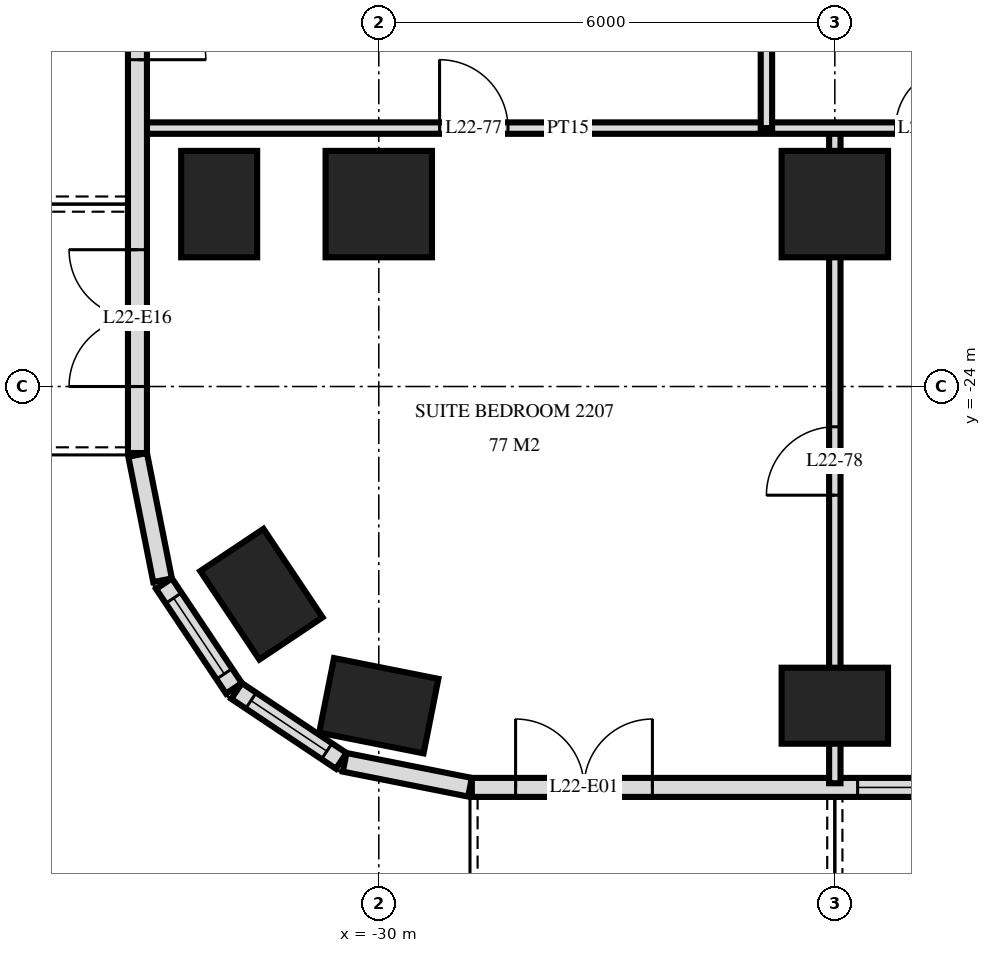
"""IFC4 building model, lengths in metres.
Left out: names, types, materials, properties, quantities, classifications, styles, units other than length and angle.
Written with IfcOpenShell. Run it as: python <this file> out.ifc"""

import sys

from ifc_helpers import new_model, si_unit, direction, frame, frame_2d, origin, origin_2d, place, context, subcontext, project, spatial, rectangle, extrude, element, fill, save


model = new_model("IFC4")
c1 = context("Model", 3, precision=1e-05, world=origin(), true_north=direction((0.0, 1.0)))
c2 = subcontext(c1, "Body", "Model", "MODEL_VIEW")
j1 = project(units=[si_unit("LENGTHUNIT", "METRE"), si_unit("PLANEANGLEUNIT", "RADIAN")], contexts=[c1])
p1 = place(None, origin())
s1 = spatial("IfcSite", under=j1, at=p1, CompositionType="ELEMENT")
p2 = place(p1, origin())
s2 = spatial("IfcBuilding", under=s1, at=p2, CompositionType="ELEMENT")
p3 = place(p2, frame((0.0, 0.0, 88.8)))
s3 = spatial("IfcBuildingStorey", under=s2, at=p3, CompositionType="ELEMENT", Elevation=88.8)
for number, where, z_axis, x_axis in (
    (1, (-32.1, -21.6, 0.0), (0.0, 0.0, 1.0), (0.0, 1.0, 0.0)),
    (2, (-31.544, -26.733, 0.0), (0.0, 0.0, 1.0), (-0.556, 0.831, 0.0)),
    (3, (-30.0, -28.2, 0.0), (0.0, 0.0, 1.0), (-0.981, 0.195, 0.0)),
):
    element("IfcColumn", number, at=place(p3, frame(where, z_axis=z_axis, x_axis=x_axis)), inside=s3, PredefinedType="COLUMN", context=c2, shape_type="SweptSolid", body=[
        extrude(rectangle(XDim=1.4, YDim=1.0, at=origin_2d()), origin(), (0.0, 0.0, 1.0), 3.6),
    ])
p4 = place(p3, frame((-30.0, -21.6, 0.0), z_axis=(0.0, 0.0, 1.0), x_axis=(1.0, 0.0, 0.0)))
e4 = element("IfcColumn", 4, at=p4, inside=s3, PredefinedType="COLUMN", context=c2, shape_type="SweptSolid", body=[
    extrude(rectangle(XDim=1.4, YDim=1.4, at=origin_2d()), origin(), (0.0, 0.0, 1.0), 3.6),
])
p5 = place(p3, frame((-24.0, -28.2, 0.0), z_axis=(0.0, 0.0, 1.0), x_axis=(1.0, 0.0, 0.0)))
e5 = element("IfcColumn", 5, at=p5, inside=s3, PredefinedType="COLUMN", context=c2, shape_type="SweptSolid", body=[
    extrude(rectangle(XDim=1.4, YDim=1.0, at=origin_2d()), origin(), (0.0, 0.0, 1.0), 3.6),
])
p6 = place(p3, frame((-24.0, -21.6, 0.0), z_axis=(0.0, 0.0, 1.0), x_axis=(1.0, 0.0, 0.0)))
e6 = element("IfcColumn", 6, at=p6, inside=s3, PredefinedType="COLUMN", context=c2, shape_type="SweptSolid", body=[
    extrude(rectangle(XDim=1.4, YDim=1.4, at=origin_2d()), origin(), (0.0, 0.0, 1.0), 3.6),
])
p7 = place(p3, frame((-33.175, -3.325, 0.0), z_axis=(0.0, 0.0, 1.0), x_axis=(0.0, -1.0, 0.0)))
e7 = element("IfcWall", 7, at=p7, inside=s3, PredefinedType="SOLIDWALL", context=c2, shape_type="SweptSolid", body=[
    extrude(rectangle(XDim=21.551, YDim=0.25, at=frame_2d((10.775, 0.0))), origin(), (0.0, 0.0, 1.0), 3.32),
])
p8 = place(p7, frame((7.025, 0.0, 0.0)))
e8 = element("IfcOpeningElement", 8, at=p8, cuts=e7, PredefinedType="OPENING", context=c2, shape_type="SweptSolid", body=[
    extrude(rectangle(XDim=1.8, YDim=2.4, at=frame_2d((0.9, 1.2))), frame((0.0, 0.135, 0.0), z_axis=(0.0, -1.0, 0.0), x_axis=(1.0, 0.0, 0.0)), (0.0, 0.0, 1.0), 0.27),
])
p9 = place(p7, frame((12.075, 0.0, 0.3)))
e9 = element("IfcOpeningElement", 9, at=p9, cuts=e7, PredefinedType="OPENING", context=c2, shape_type="SweptSolid", body=[
    extrude(rectangle(XDim=1.2, YDim=2.1, at=frame_2d((0.6, 1.05))), frame((0.0, 0.135, 0.0), z_axis=(0.0, -1.0, 0.0), x_axis=(1.0, 0.0, 0.0)), (0.0, 0.0, 1.0), 0.27),
])
p10 = place(p7, frame((14.575, 0.0, 0.0)))
e10 = element("IfcOpeningElement", 10, at=p10, cuts=e7, PredefinedType="OPENING", context=c2, shape_type="SweptSolid", body=[
    extrude(rectangle(XDim=1.8, YDim=2.4, at=frame_2d((0.9, 1.2))), frame((0.0, 0.135, 0.0), z_axis=(0.0, -1.0, 0.0), x_axis=(1.0, 0.0, 0.0)), (0.0, 0.0, 1.0), 0.27),
])
p11 = place(p7, frame((18.875, 0.0, 0.0)))
e11 = element("IfcOpeningElement", 11, at=p11, cuts=e7, PredefinedType="OPENING", context=c2, shape_type="SweptSolid", body=[
    extrude(rectangle(XDim=1.8, YDim=2.4, at=frame_2d((0.9, 1.2))), frame((0.0, 0.135, 0.0), z_axis=(0.0, -1.0, 0.0), x_axis=(1.0, 0.0, 0.0)), (0.0, 0.0, 1.0), 0.27),
])
p12 = place(p3, frame((-33.173, -24.9, 0.0), z_axis=(0.0, 0.0, 1.0), x_axis=(0.195166572128, -0.980770110232, 0.0)))
e12 = element("IfcWall", 12, at=p12, inside=s3, PredefinedType="SOLIDWALL", context=c2, shape_type="SweptSolid", body=[
    extrude(rectangle(XDim=1.681, YDim=0.25, at=frame_2d((0.841, 0.0))), origin(), (0.0, 0.0, 1.0), 3.32),
])
p13 = place(p3, frame((-32.826, -26.594, 0.0), z_axis=(0.0, 0.0, 1.0), x_axis=(0.55555029066, -0.831482937015, 0.0)))
e13 = element("IfcWall", 13, at=p13, inside=s3, PredefinedType="SOLIDWALL", context=c2, shape_type="SweptSolid", body=[
    extrude(rectangle(XDim=1.656, YDim=0.25, at=frame_2d((0.828, 0.0))), origin(), (0.0, 0.0, 1.0), 3.32),
])
p14 = place(p13, frame((0.228, 0.0, 0.9)))
e14 = element("IfcOpeningElement", 14, at=p14, cuts=e13, PredefinedType="OPENING", context=c2, shape_type="SweptSolid", body=[
    extrude(rectangle(XDim=1.2, YDim=1.5, at=frame_2d((0.6, 0.75))), frame((0.0, 0.135, 0.0), z_axis=(0.0, -1.0, 0.0), x_axis=(1.0, 0.0, 0.0)), (0.0, 0.0, 1.0), 0.27),
])
p15 = place(p3, frame((-31.871, -28.006, 0.0), z_axis=(0.0, 0.0, 1.0), x_axis=(0.831482937015, -0.55555029066, 0.0)))
e15 = element("IfcWall", 15, at=p15, inside=s3, PredefinedType="SOLIDWALL", context=c2, shape_type="SweptSolid", body=[
    extrude(rectangle(XDim=1.656, YDim=0.25, at=frame_2d((0.828, 0.0))), origin(), (0.0, 0.0, 1.0), 3.32),
])
p16 = place(p15, frame((0.228, 0.0, 0.9)))
e16 = element("IfcOpeningElement", 16, at=p16, cuts=e15, PredefinedType="OPENING", context=c2, shape_type="SweptSolid", body=[
    extrude(rectangle(XDim=1.2, YDim=1.5, at=frame_2d((0.6, 0.75))), frame((0.0, 0.135, 0.0), z_axis=(0.0, -1.0, 0.0), x_axis=(1.0, 0.0, 0.0)), (0.0, 0.0, 1.0), 0.27),
])
p17 = place(p3, frame((-30.449, -28.945, 0.0), z_axis=(0.0, 0.0, 1.0), x_axis=(0.980775640221, -0.19513878023, 0.0)))
e17 = element("IfcWall", 17, at=p17, inside=s3, PredefinedType="SOLIDWALL", context=c2, shape_type="SweptSolid", body=[
    extrude(rectangle(XDim=1.681, YDim=0.25, at=frame_2d((0.841, 0.0))), origin(), (0.0, 0.0, 1.0), 3.32),
])
p18 = place(p3, frame((-28.775, -29.275, 0.0), z_axis=(0.0, 0.0, 1.0), x_axis=(1.0, 0.0, 0.0)))
e18 = element("IfcWall", 18, at=p18, inside=s3, PredefinedType="SOLIDWALL", context=c2, shape_type="SweptSolid", body=[
    extrude(rectangle(XDim=57.551, YDim=0.25, at=frame_2d((28.775, 0.0))), origin(), (0.0, 0.0, 1.0), 3.32),
])
p19 = place(p18, frame((0.575, 0.0, 0.0)))
e19 = element("IfcOpeningElement", 19, at=p19, cuts=e18, PredefinedType="OPENING", context=c2, shape_type="SweptSolid", body=[
    extrude(rectangle(XDim=1.8, YDim=2.4, at=frame_2d((0.9, 1.2))), frame((0.0, 0.135, 0.0), z_axis=(0.0, -1.0, 0.0), x_axis=(1.0, 0.0, 0.0)), (0.0, 0.0, 1.0), 0.27),
])
p20 = place(p18, frame((5.075, 0.0, 0.3)))
e20 = element("IfcOpeningElement", 20, at=p20, cuts=e18, PredefinedType="OPENING", context=c2, shape_type="SweptSolid", body=[
    extrude(rectangle(XDim=2.4, YDim=2.1, at=frame_2d((1.2, 1.05))), frame((0.0, 0.135, 0.0), z_axis=(0.0, -1.0, 0.0), x_axis=(1.0, 0.0, 0.0)), (0.0, 0.0, 1.0), 0.27),
])
p21 = place(p18, frame((8.375, 0.0, 0.0)))
e21 = element("IfcOpeningElement", 21, at=p21, cuts=e18, PredefinedType="OPENING", context=c2, shape_type="SweptSolid", body=[
    extrude(rectangle(XDim=1.8, YDim=2.4, at=frame_2d((0.9, 1.2))), frame((0.0, 0.135, 0.0), z_axis=(0.0, -1.0, 0.0), x_axis=(1.0, 0.0, 0.0)), (0.0, 0.0, 1.0), 0.27),
])
p22 = place(p18, frame((11.375, 0.0, 0.0)))
e22 = element("IfcOpeningElement", 22, at=p22, cuts=e18, PredefinedType="OPENING", context=c2, shape_type="SweptSolid", body=[
    extrude(rectangle(XDim=1.8, YDim=2.4, at=frame_2d((0.9, 1.2))), frame((0.0, 0.135, 0.0), z_axis=(0.0, -1.0, 0.0), x_axis=(1.0, 0.0, 0.0)), (0.0, 0.0, 1.0), 0.27),
])
p23 = place(p18, frame((14.075, 0.0, 0.3)))
e23 = element("IfcOpeningElement", 23, at=p23, cuts=e18, PredefinedType="OPENING", context=c2, shape_type="SweptSolid", body=[
    extrude(rectangle(XDim=2.4, YDim=2.1, at=frame_2d((1.2, 1.05))), frame((0.0, 0.135, 0.0), z_axis=(0.0, -1.0, 0.0), x_axis=(1.0, 0.0, 0.0)), (0.0, 0.0, 1.0), 0.27),
])
p24 = place(p18, frame((17.375, 0.0, 0.0)))
e24 = element("IfcOpeningElement", 24, at=p24, cuts=e18, PredefinedType="OPENING", context=c2, shape_type="SweptSolid", body=[
    extrude(rectangle(XDim=1.8, YDim=2.4, at=frame_2d((0.9, 1.2))), frame((0.0, 0.135, 0.0), z_axis=(0.0, -1.0, 0.0), x_axis=(1.0, 0.0, 0.0)), (0.0, 0.0, 1.0), 0.27),
])
p25 = place(p18, frame((20.075, 0.0, 0.3)))
e25 = element("IfcOpeningElement", 25, at=p25, cuts=e18, PredefinedType="OPENING", context=c2, shape_type="SweptSolid", body=[
    extrude(rectangle(XDim=2.4, YDim=2.1, at=frame_2d((1.2, 1.05))), frame((0.0, 0.135, 0.0), z_axis=(0.0, -1.0, 0.0), x_axis=(1.0, 0.0, 0.0)), (0.0, 0.0, 1.0), 0.27),
])
p26 = place(p18, frame((23.075, 0.0, 0.3)))
e26 = element("IfcOpeningElement", 26, at=p26, cuts=e18, PredefinedType="OPENING", context=c2, shape_type="SweptSolid", body=[
    extrude(rectangle(XDim=2.4, YDim=2.1, at=frame_2d((1.2, 1.05))), frame((0.0, 0.135, 0.0), z_axis=(0.0, -1.0, 0.0), x_axis=(1.0, 0.0, 0.0)), (0.0, 0.0, 1.0), 0.27),
])
p27 = place(p18, frame((26.375, 0.0, 0.0)))
e27 = element("IfcOpeningElement", 27, at=p27, cuts=e18, PredefinedType="OPENING", context=c2, shape_type="SweptSolid", body=[
    extrude(rectangle(XDim=1.8, YDim=2.4, at=frame_2d((0.9, 1.2))), frame((0.0, 0.135, 0.0), z_axis=(0.0, -1.0, 0.0), x_axis=(1.0, 0.0, 0.0)), (0.0, 0.0, 1.0), 0.27),
])
p28 = place(p18, frame((29.375, 0.0, 0.0)))
e28 = element("IfcOpeningElement", 28, at=p28, cuts=e18, PredefinedType="OPENING", context=c2, shape_type="SweptSolid", body=[
    extrude(rectangle(XDim=1.8, YDim=2.4, at=frame_2d((0.9, 1.2))), frame((0.0, 0.135, 0.0), z_axis=(0.0, -1.0, 0.0), x_axis=(1.0, 0.0, 0.0)), (0.0, 0.0, 1.0), 0.27),
])
p29 = place(p18, frame((32.075, 0.0, 0.3)))
e29 = element("IfcOpeningElement", 29, at=p29, cuts=e18, PredefinedType="OPENING", context=c2, shape_type="SweptSolid", body=[
    extrude(rectangle(XDim=2.4, YDim=2.1, at=frame_2d((1.2, 1.05))), frame((0.0, 0.135, 0.0), z_axis=(0.0, -1.0, 0.0), x_axis=(1.0, 0.0, 0.0)), (0.0, 0.0, 1.0), 0.27),
])
p30 = place(p18, frame((35.375, 0.0, 0.0)))
e30 = element("IfcOpeningElement", 30, at=p30, cuts=e18, PredefinedType="OPENING", context=c2, shape_type="SweptSolid", body=[
    extrude(rectangle(XDim=1.8, YDim=2.4, at=frame_2d((0.9, 1.2))), frame((0.0, 0.135, 0.0), z_axis=(0.0, -1.0, 0.0), x_axis=(1.0, 0.0, 0.0)), (0.0, 0.0, 1.0), 0.27),
])
p31 = place(p18, frame((38.075, 0.0, 0.3)))
e31 = element("IfcOpeningElement", 31, at=p31, cuts=e18, PredefinedType="OPENING", context=c2, shape_type="SweptSolid", body=[
    extrude(rectangle(XDim=2.4, YDim=2.1, at=frame_2d((1.2, 1.05))), frame((0.0, 0.135, 0.0), z_axis=(0.0, -1.0, 0.0), x_axis=(1.0, 0.0, 0.0)), (0.0, 0.0, 1.0), 0.27),
])
p32 = place(p18, frame((41.075, 0.0, 0.3)))
e32 = element("IfcOpeningElement", 32, at=p32, cuts=e18, PredefinedType="OPENING", context=c2, shape_type="SweptSolid", body=[
    extrude(rectangle(XDim=2.4, YDim=2.1, at=frame_2d((1.2, 1.05))), frame((0.0, 0.135, 0.0), z_axis=(0.0, -1.0, 0.0), x_axis=(1.0, 0.0, 0.0)), (0.0, 0.0, 1.0), 0.27),
])
p33 = place(p18, frame((44.375, 0.0, 0.0)))
e33 = element("IfcOpeningElement", 33, at=p33, cuts=e18, PredefinedType="OPENING", context=c2, shape_type="SweptSolid", body=[
    extrude(rectangle(XDim=1.8, YDim=2.4, at=frame_2d((0.9, 1.2))), frame((0.0, 0.135, 0.0), z_axis=(0.0, -1.0, 0.0), x_axis=(1.0, 0.0, 0.0)), (0.0, 0.0, 1.0), 0.27),
])
p34 = place(p18, frame((47.075, 0.0, 0.3)))
e34 = element("IfcOpeningElement", 34, at=p34, cuts=e18, PredefinedType="OPENING", context=c2, shape_type="SweptSolid", body=[
    extrude(rectangle(XDim=2.4, YDim=2.1, at=frame_2d((1.2, 1.05))), frame((0.0, 0.135, 0.0), z_axis=(0.0, -1.0, 0.0), x_axis=(1.0, 0.0, 0.0)), (0.0, 0.0, 1.0), 0.27),
])
p35 = place(p18, frame((50.375, 0.0, 0.0)))
e35 = element("IfcOpeningElement", 35, at=p35, cuts=e18, PredefinedType="OPENING", context=c2, shape_type="SweptSolid", body=[
    extrude(rectangle(XDim=1.8, YDim=2.4, at=frame_2d((0.9, 1.2))), frame((0.0, 0.135, 0.0), z_axis=(0.0, -1.0, 0.0), x_axis=(1.0, 0.0, 0.0)), (0.0, 0.0, 1.0), 0.27),
])
p36 = place(p18, frame((53.375, 0.0, 0.0)))
e36 = element("IfcOpeningElement", 36, at=p36, cuts=e18, PredefinedType="OPENING", context=c2, shape_type="SweptSolid", body=[
    extrude(rectangle(XDim=1.8, YDim=2.4, at=frame_2d((0.9, 1.2))), frame((0.0, 0.135, 0.0), z_axis=(0.0, -1.0, 0.0), x_axis=(1.0, 0.0, 0.0)), (0.0, 0.0, 1.0), 0.27),
])
p37 = place(p3, frame((-24.0, -29.22, 0.0), z_axis=(0.0, 0.0, 1.0), x_axis=(0.0, 1.0, 0.0)))
e37 = element("IfcWall", 37, at=p37, inside=s3, PredefinedType="PARTITIONING", context=c2, shape_type="SweptSolid", body=[
    extrude(rectangle(XDim=8.62, YDim=0.15, at=frame_2d((4.31, 0.0))), origin(), (0.0, 0.0, 1.0), 3.32),
])
p38 = place(p37, frame((3.79, 0.0, 0.0)))
e38 = element("IfcOpeningElement", 38, at=p38, cuts=e37, PredefinedType="OPENING", context=c2, shape_type="SweptSolid", body=[
    extrude(rectangle(XDim=0.9, YDim=2.1, at=frame_2d((0.45, 1.05))), frame((0.0, 0.085, 0.0), z_axis=(0.0, -1.0, 0.0), x_axis=(1.0, 0.0, 0.0)), (0.0, 0.0, 1.0), 0.17),
])
p39 = place(p3, frame((-24.9, -20.6, 0.0), z_axis=(0.0, 0.0, 1.0), x_axis=(0.0, 1.0, 0.0)))
e39 = element("IfcWall", 39, at=p39, inside=s3, PredefinedType="PARTITIONING", context=c2, shape_type="SweptSolid", body=[
    extrude(rectangle(XDim=3.6, YDim=0.15, at=frame_2d((1.8, 0.0))), origin(), (0.0, 0.0, 1.0), 3.32),
])
p40 = place(p3, frame((-33.12, -20.6, 0.0), z_axis=(0.0, 0.0, 1.0), x_axis=(1.0, 0.0, 0.0)))
e40 = element("IfcWall", 40, at=p40, inside=s3, PredefinedType="PARTITIONING", context=c2, shape_type="SweptSolid", body=[
    extrude(rectangle(XDim=11.22, YDim=0.15, at=frame_2d((5.61, 0.0))), origin(), (0.0, 0.0, 1.0), 3.32),
])
p41 = place(p40, frame((9.92, 0.0, 0.0)))
e41 = element("IfcOpeningElement", 41, at=p41, cuts=e40, PredefinedType="OPENING", context=c2, shape_type="SweptSolid", body=[
    extrude(rectangle(XDim=0.8, YDim=2.1, at=frame_2d((0.4, 1.05))), frame((0.0, 0.085, 0.0), z_axis=(0.0, -1.0, 0.0), x_axis=(1.0, 0.0, 0.0)), (0.0, 0.0, 1.0), 0.17),
])
p42 = place(p40, frame((3.92, 0.0, 0.0)))
e42 = element("IfcOpeningElement", 42, at=p42, cuts=e40, PredefinedType="OPENING", context=c2, shape_type="SweptSolid", body=[
    extrude(rectangle(XDim=0.9, YDim=2.1, at=frame_2d((0.45, 1.05))), frame((0.0, 0.085, 0.0), z_axis=(0.0, -1.0, 0.0), x_axis=(1.0, 0.0, 0.0)), (0.0, 0.0, 1.0), 0.17),
])
p43 = place(p14, origin())
e43 = element("IfcWindow", 43, at=p43, inside=s3, PartitioningType="SINGLE_PANEL", PredefinedType="WINDOW", context=c2, shape_type="SweptSolid", body=[
    extrude(rectangle(XDim=1.2, YDim=1.5, at=frame_2d((0.6, 0.75))), frame((0.0, 0.03, 0.0), z_axis=(0.0, -1.0, 0.0), x_axis=(1.0, 0.0, 0.0)), (0.0, 0.0, 1.0), 0.06),
])
fill(e14, e43)
p44 = place(p16, origin())
e44 = element("IfcWindow", 44, at=p44, inside=s3, PartitioningType="SINGLE_PANEL", PredefinedType="WINDOW", context=c2, shape_type="SweptSolid", body=[
    extrude(rectangle(XDim=1.2, YDim=1.5, at=frame_2d((0.6, 0.75))), frame((0.0, 0.03, 0.0), z_axis=(0.0, -1.0, 0.0), x_axis=(1.0, 0.0, 0.0)), (0.0, 0.0, 1.0), 0.06),
])
fill(e16, e44)
p45 = place(p19, origin())
e45 = element("IfcDoor", 45, at=p45, inside=s3, OperationType="DOUBLE_DOOR_SINGLE_SWING", PredefinedType="DOOR", context=c2, shape_type="SweptSolid", body=[
    extrude(rectangle(XDim=1.8, YDim=2.4, at=frame_2d((0.9, 1.2))), frame((0.0, 0.025, 0.0), z_axis=(0.0, -1.0, 0.0), x_axis=(1.0, 0.0, 0.0)), (0.0, 0.0, 1.0), 0.05),
])
fill(e19, e45)
p46 = place(p20, origin())
e46 = element("IfcWindow", 46, at=p46, inside=s3, PartitioningType="SINGLE_PANEL", PredefinedType="WINDOW", context=c2, shape_type="SweptSolid", body=[
    extrude(rectangle(XDim=2.4, YDim=2.1, at=frame_2d((1.2, 1.05))), frame((0.0, 0.03, 0.0), z_axis=(0.0, -1.0, 0.0), x_axis=(1.0, 0.0, 0.0)), (0.0, 0.0, 1.0), 0.06),
])
fill(e20, e46)
p47 = place(p10, origin())
e47 = element("IfcDoor", 47, at=p47, inside=s3, OperationType="DOUBLE_DOOR_SINGLE_SWING", PredefinedType="DOOR", context=c2, shape_type="SweptSolid", body=[
    extrude(rectangle(XDim=1.8, YDim=2.4, at=frame_2d((0.9, 1.2))), frame((0.0, 0.025, 0.0), z_axis=(0.0, -1.0, 0.0), x_axis=(1.0, 0.0, 0.0)), (0.0, 0.0, 1.0), 0.05),
])
fill(e10, e47)
p48 = place(p11, frame((0.9, 0.0, 0.0), z_axis=(0.0, 0.0, 1.0), x_axis=(-1.0, 0.0, 0.0)))
e48 = element("IfcDoor", 48, at=p48, inside=s3, OperationType="DOUBLE_DOOR_SINGLE_SWING", PredefinedType="DOOR", context=c2, shape_type="SweptSolid", body=[
    extrude(rectangle(XDim=1.8, YDim=2.4, at=frame_2d((0.0, 1.2))), frame((0.0, -0.025, 0.0), z_axis=(0.0, 1.0, 0.0), x_axis=(-1.0, 0.0, 0.0)), (0.0, 0.0, 1.0), 0.05),
])
fill(e11, e48)
p49 = place(p41, origin())
e49 = element("IfcDoor", 49, at=p49, inside=s3, OperationType="SINGLE_SWING_LEFT", PredefinedType="DOOR", context=c2, shape_type="SweptSolid", body=[
    extrude(rectangle(XDim=0.8, YDim=2.1, at=frame_2d((0.4, 1.05))), frame((0.0, 0.025, 0.0), z_axis=(0.0, -1.0, 0.0), x_axis=(1.0, 0.0, 0.0)), (0.0, 0.0, 1.0), 0.05),
])
fill(e41, e49)
p50 = place(p42, origin())
e50 = element("IfcDoor", 50, at=p50, inside=s3, OperationType="SINGLE_SWING_RIGHT", PredefinedType="DOOR", context=c2, shape_type="SweptSolid", body=[
    extrude(rectangle(XDim=0.9, YDim=2.1, at=frame_2d((0.45, 1.05))), frame((0.0, 0.025, 0.0), z_axis=(0.0, -1.0, 0.0), x_axis=(1.0, 0.0, 0.0)), (0.0, 0.0, 1.0), 0.05),
])
fill(e42, e50)
p51 = place(p38, origin())
e51 = element("IfcDoor", 51, at=p51, inside=s3, OperationType="SINGLE_SWING_RIGHT", PredefinedType="DOOR", context=c2, shape_type="SweptSolid", body=[
    extrude(rectangle(XDim=0.9, YDim=2.1, at=frame_2d((0.45, 1.05))), frame((0.0, 0.025, 0.0), z_axis=(0.0, -1.0, 0.0), x_axis=(1.0, 0.0, 0.0)), (0.0, 0.0, 1.0), 0.05),
])
fill(e38, e51)
save(model, sys.argv[1])
